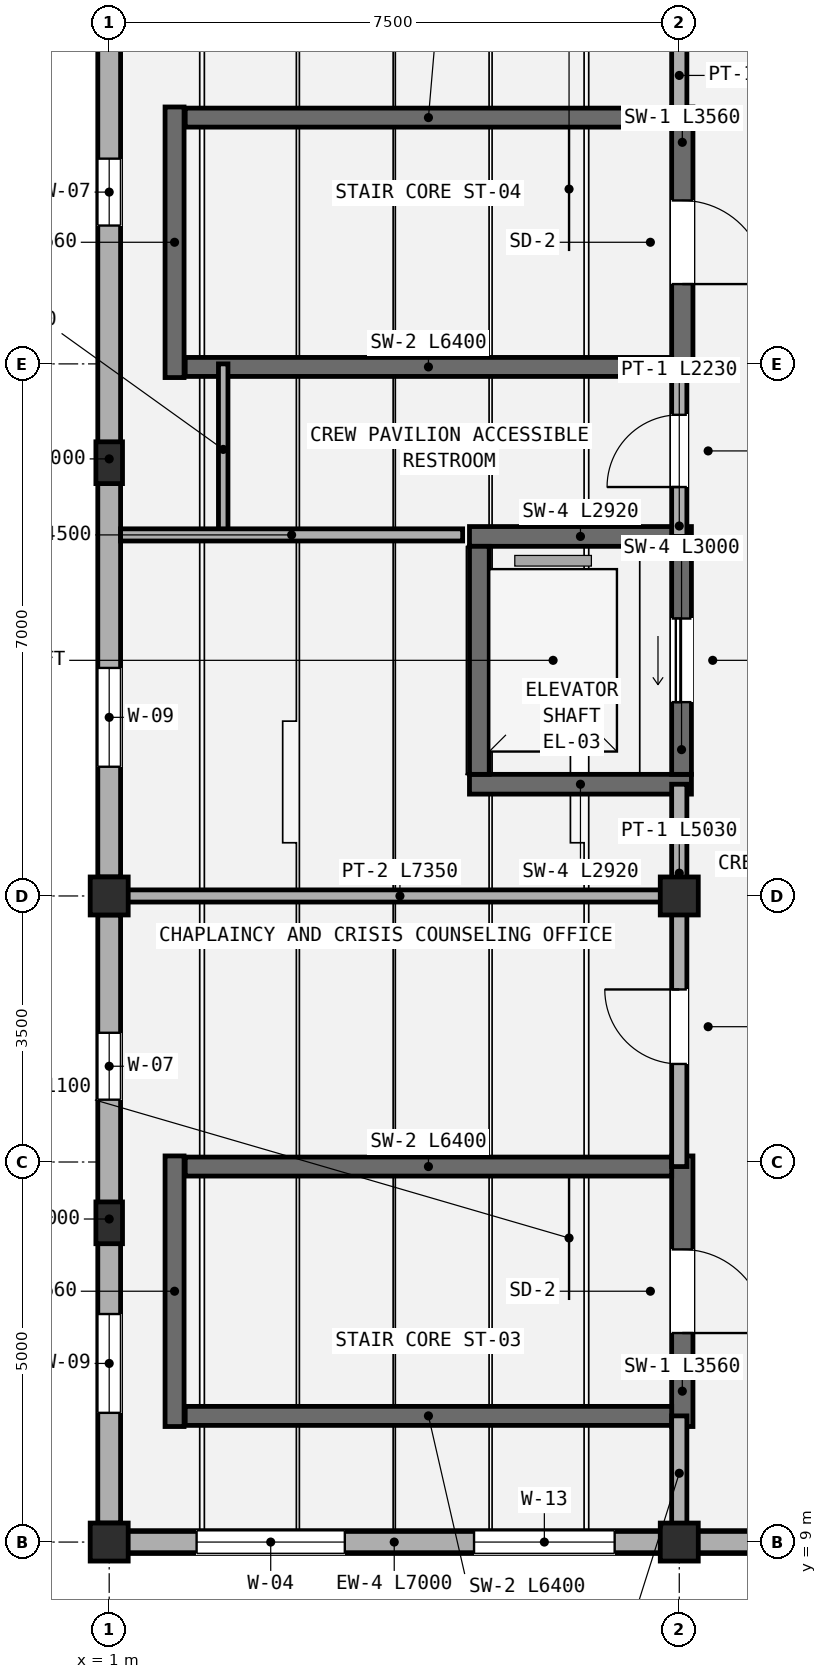
"""IFC4 building model, lengths in metres.
Left out: names, types, materials, properties, quantities, classifications, styles, units other than length and angle.
Written with IfcOpenShell. Run it as: python <this file> out.ifc"""

import sys

from ifc_helpers import new_model, si_unit, direction, frame, frame_2d, origin, origin_2d, place, context, subcontext, project, spatial, polyline, rectangle, outline, extrude, element, fill, save


model = new_model("IFC4")
c1 = context("Model", 3, precision=1e-05, world=origin(), true_north=direction((0.0, 1.0)))
c2 = subcontext(c1, "Body", "Model", "MODEL_VIEW")
j1 = project(units=[si_unit("LENGTHUNIT", "METRE"), si_unit("PLANEANGLEUNIT", "RADIAN")], contexts=[c1])
p1 = place(None, origin())
s1 = spatial("IfcSite", under=j1, at=p1, CompositionType="ELEMENT")
p2 = place(p1, origin())
s2 = spatial("IfcBuilding", under=s1, at=p2, CompositionType="ELEMENT")
p3 = place(p2, frame((0.0, 0.0, 12.75)))
s3 = spatial("IfcBuildingStorey", under=s2, at=p3, CompositionType="ELEMENT", Elevation=12.75)
for number, where, z_axis, x_axis in (
    (1, (1.0, 9.0, 0.0), (0.0, 0.0, 1.0), (1.0, 0.0, 0.0)),
    (2, (1.0, 17.5, 0.0), (0.0, 0.0, 1.0), (1.0, 0.0, 0.0)),
    (3, (8.5, 9.0, 0.0), (0.0, 0.0, 1.0), (1.0, 0.0, 0.0)),
    (4, (8.5, 17.5, 0.0), (0.0, 0.0, 1.0), (1.0, 0.0, 0.0)),
):
    element("IfcColumn", number, at=place(p3, frame(where, z_axis=z_axis, x_axis=x_axis)), inside=s3, PredefinedType="COLUMN", context=c2, shape_type="SweptSolid", body=[
        extrude(rectangle(XDim=0.5, YDim=0.5, at=origin_2d()), origin(), (0.0, 0.0, 1.0), 2.9),
    ])
for number, where, z_axis, x_axis in (
    (5, (1.0, 13.2, 0.0), (0.0, 0.0, 1.0), (1.0, 0.0, 0.0)),
    (6, (1.0, 23.2, 0.0), (0.0, 0.0, 1.0), (1.0, 0.0, 0.0)),
):
    element("IfcColumn", number, at=place(p3, frame(where, z_axis=z_axis, x_axis=x_axis)), inside=s3, PredefinedType="PILASTER", context=c2, shape_type="SweptSolid", body=[
        extrude(rectangle(XDim=0.35, YDim=0.55, at=origin_2d()), origin(), (0.0, 0.0, 1.0), 2.9),
    ])
p4 = place(p3, frame((1.25, 9.0, 0.0), z_axis=(0.0, 0.0, 1.0), x_axis=(1.0, 0.0, 0.0)))
e7 = element("IfcWall", 7, at=p4, inside=s3, PredefinedType="STANDARD", context=c2, shape_type="SweptSolid", body=[
    extrude(rectangle(XDim=7.0, YDim=0.3, at=frame_2d((3.5, 0.0))), origin(), (0.0, 0.0, 1.0), 2.25),
])
p5 = place(p4, frame((0.9, 0.0, 0.66)))
e8 = element("IfcOpeningElement", 8, at=p5, cuts=e7, PredefinedType="OPENING", context=c2, shape_type="SweptSolid", body=[
    extrude(rectangle(XDim=1.95, YDim=1.35, at=frame_2d((0.975, 0.675))), frame((0.0, 0.16, 0.0), z_axis=(0.0, -1.0, 0.0), x_axis=(1.0, 0.0, 0.0)), (0.0, 0.0, 1.0), 0.32),
])
p6 = place(p4, frame((4.55, 0.0, 0.71)))
e9 = element("IfcOpeningElement", 9, at=p6, cuts=e7, PredefinedType="OPENING", context=c2, shape_type="SweptSolid", body=[
    extrude(rectangle(XDim=1.85, YDim=1.3, at=frame_2d((0.925, 0.65))), frame((0.0, 0.16, 0.0), z_axis=(0.0, -1.0, 0.0), x_axis=(1.0, 0.0, 0.0)), (0.0, 0.0, 1.0), 0.32),
])
p7 = place(p3, frame((8.75, 9.0, 0.0), z_axis=(0.0, 0.0, 1.0), x_axis=(1.0, 0.0, 0.0)))
e10 = element("IfcWall", 10, at=p7, inside=s3, PredefinedType="STANDARD", context=c2, shape_type="SweptSolid", body=[
    extrude(rectangle(XDim=3.5, YDim=0.3, at=frame_2d((1.75, 0.0))), origin(), (0.0, 0.0, 1.0), 2.25),
])
p8 = place(p7, frame((0.9, 0.0, 0.66)))
e11 = element("IfcOpeningElement", 11, at=p8, cuts=e10, PredefinedType="OPENING", context=c2, shape_type="SweptSolid", body=[
    extrude(rectangle(XDim=1.95, YDim=1.35, at=frame_2d((0.975, 0.675))), frame((0.0, 0.16, 0.0), z_axis=(0.0, -1.0, 0.0), x_axis=(1.0, 0.0, 0.0)), (0.0, 0.0, 1.0), 0.32),
])
p9 = place(p3, frame((1.0, 9.0, 2.9), z_axis=(0.0, 0.0, 1.0), x_axis=(1.0, 0.0, 0.0)))
e12 = element("IfcWall", 12, at=p9, inside=s3, PredefinedType="PARAPET", context=c2, shape_type="SweptSolid", body=[
    extrude(outline(polyline([(0.0, 0.0), (7.5, 0.0), (7.5, 0.8), (6.668, 0.8), (6.667, 0.888), (5.834, 0.888), (5.833, 0.975), (5.001, 0.975), (5.0, 1.062), (4.168, 1.062), (4.167, 1.15), (3.334, 1.15), (3.333, 1.062), (2.501, 1.062), (2.5, 0.975), (1.668, 0.975), (1.667, 0.888), (0.834, 0.888), (0.833, 0.8), (0.0, 0.8), (0.0, 0.0)])), frame((0.0, 0.14, 0.0), z_axis=(0.0, -1.0, 0.0), x_axis=(1.0, 0.0, 0.0)), (0.0, 0.0, 1.0), 0.28),
])
p10 = place(p3, frame((8.5, 9.0, 2.9), z_axis=(0.0, 0.0, 1.0), x_axis=(1.0, 0.0, 0.0)))
e13 = element("IfcWall", 13, at=p10, inside=s3, PredefinedType="PARAPET", context=c2, shape_type="SweptSolid", body=[
    extrude(outline(polyline([(0.0, 0.0), (4.0, 0.0), (4.0, 0.8), (3.557, 0.8), (3.556, 0.888), (3.112, 0.888), (3.111, 0.975), (2.668, 0.975), (2.667, 1.062), (2.223, 1.062), (2.222, 1.15), (1.779, 1.15), (1.778, 1.062), (1.334, 1.062), (1.333, 0.975), (0.89, 0.975), (0.889, 0.888), (0.445, 0.888), (0.444, 0.8), (0.0, 0.8), (0.0, 0.0)])), frame((0.0, 0.14, 0.0), z_axis=(0.0, -1.0, 0.0), x_axis=(1.0, 0.0, 0.0)), (0.0, 0.0, 1.0), 0.28),
])
p11 = place(p3, frame((1.0, 17.25, 0.0), z_axis=(0.0, 0.0, 1.0), x_axis=(0.0, -1.0, 0.0)))
e14 = element("IfcWall", 14, at=p11, inside=s3, PredefinedType="STANDARD", context=c2, shape_type="SweptSolid", body=[
    extrude(rectangle(XDim=8.0, YDim=0.3, at=frame_2d((4.0, 0.0))), origin(), (0.0, 0.0, 1.0), 2.25),
])
p12 = place(p11, frame((1.55, 0.0, 0.51)))
e15 = element("IfcOpeningElement", 15, at=p12, cuts=e14, PredefinedType="OPENING", context=c2, shape_type="SweptSolid", body=[
    extrude(rectangle(XDim=0.88, YDim=1.5, at=frame_2d((0.44, 0.75))), frame((0.0, 0.16, 0.0), z_axis=(0.0, -1.0, 0.0), x_axis=(1.0, 0.0, 0.0)), (0.0, 0.0, 1.0), 0.32),
])
p13 = place(p11, frame((5.25, 0.0, 0.61)))
e16 = element("IfcOpeningElement", 16, at=p13, cuts=e14, PredefinedType="OPENING", context=c2, shape_type="SweptSolid", body=[
    extrude(rectangle(XDim=1.3, YDim=1.4, at=frame_2d((0.65, 0.7))), frame((0.0, 0.16, 0.0), z_axis=(0.0, -1.0, 0.0), x_axis=(1.0, 0.0, 0.0)), (0.0, 0.0, 1.0), 0.32),
])
p14 = place(p3, frame((1.0, 28.75, 0.0), z_axis=(0.0, 0.0, 1.0), x_axis=(0.0, -1.0, 0.0)))
e17 = element("IfcWall", 17, at=p14, inside=s3, PredefinedType="STANDARD", context=c2, shape_type="SweptSolid", body=[
    extrude(rectangle(XDim=11.0, YDim=0.3, at=frame_2d((5.5, 0.0))), origin(), (0.0, 0.0, 1.0), 2.25),
])
p15 = place(p14, frame((1.55, 0.0, 0.51)))
e18 = element("IfcOpeningElement", 18, at=p15, cuts=e17, PredefinedType="OPENING", context=c2, shape_type="SweptSolid", body=[
    extrude(rectangle(XDim=0.88, YDim=1.5, at=frame_2d((0.44, 0.75))), frame((0.0, 0.16, 0.0), z_axis=(0.0, -1.0, 0.0), x_axis=(1.0, 0.0, 0.0)), (0.0, 0.0, 1.0), 0.32),
])
p16 = place(p14, frame((8.25, 0.0, 0.61)))
e19 = element("IfcOpeningElement", 19, at=p16, cuts=e17, PredefinedType="OPENING", context=c2, shape_type="SweptSolid", body=[
    extrude(rectangle(XDim=1.3, YDim=1.4, at=frame_2d((0.65, 0.7))), frame((0.0, 0.16, 0.0), z_axis=(0.0, -1.0, 0.0), x_axis=(1.0, 0.0, 0.0)), (0.0, 0.0, 1.0), 0.32),
])
p17 = place(p3, frame((8.54, 14.08, 0.0), z_axis=(0.0, 0.0, 1.0), x_axis=(0.0, -1.0, 0.0)))
e20 = element("IfcWall", 20, at=p17, inside=s3, PredefinedType="SHEAR", context=c2, shape_type="SweptSolid", body=[
    extrude(rectangle(XDim=3.56, YDim=0.28, at=frame_2d((1.78, 0.0))), origin(), (0.0, 0.0, 1.0), 2.8),
])
p18 = place(p17, frame((1.23, 0.0, 0.0)))
e21 = element("IfcOpeningElement", 21, at=p18, cuts=e20, PredefinedType="OPENING", context=c2, shape_type="SweptSolid", body=[
    extrude(rectangle(XDim=1.1, YDim=2.15, at=frame_2d((0.55, 1.075))), frame((0.0, 0.15, 0.0), z_axis=(0.0, -1.0, 0.0), x_axis=(1.0, 0.0, 0.0)), (0.0, 0.0, 1.0), 0.3),
])
p19 = place(p3, frame((1.86, 10.52, 0.0), z_axis=(0.0, 0.0, 1.0), x_axis=(0.0, 1.0, 0.0)))
e22 = element("IfcWall", 22, at=p19, inside=s3, PredefinedType="SHEAR", context=c2, shape_type="SweptSolid", body=[
    extrude(rectangle(XDim=3.56, YDim=0.25, at=frame_2d((1.78, 0.0))), origin(), (0.0, 0.0, 1.0), 2.8),
])
for number, where, z_axis, x_axis in (
    (23, (8.4, 13.94, 0.0), (0.0, 0.0, 1.0), (-1.0, 0.0, 0.0)),
    (24, (2.0, 10.66, 0.0), (0.0, 0.0, 1.0), (1.0, 0.0, 0.0)),
):
    element("IfcWall", number, at=place(p3, frame(where, z_axis=z_axis, x_axis=x_axis)), inside=s3, PredefinedType="SHEAR", context=c2, shape_type="SweptSolid", body=[
        extrude(rectangle(XDim=6.4, YDim=0.25, at=frame_2d((3.2, 0.0))), origin(), (0.0, 0.0, 1.0), 2.8),
    ])
p20 = place(p3, frame((8.54, 27.88, 0.0), z_axis=(0.0, 0.0, 1.0), x_axis=(0.0, -1.0, 0.0)))
e25 = element("IfcWall", 25, at=p20, inside=s3, PredefinedType="SHEAR", context=c2, shape_type="SweptSolid", body=[
    extrude(rectangle(XDim=3.56, YDim=0.28, at=frame_2d((1.78, 0.0))), origin(), (0.0, 0.0, 1.0), 2.8),
])
p21 = place(p20, frame((1.23, 0.0, 0.0)))
e26 = element("IfcOpeningElement", 26, at=p21, cuts=e25, PredefinedType="OPENING", context=c2, shape_type="SweptSolid", body=[
    extrude(rectangle(XDim=1.1, YDim=2.15, at=frame_2d((0.55, 1.075))), frame((0.0, 0.15, 0.0), z_axis=(0.0, -1.0, 0.0), x_axis=(1.0, 0.0, 0.0)), (0.0, 0.0, 1.0), 0.3),
])
p22 = place(p3, frame((1.86, 24.32, 0.0), z_axis=(0.0, 0.0, 1.0), x_axis=(0.0, 1.0, 0.0)))
e27 = element("IfcWall", 27, at=p22, inside=s3, PredefinedType="SHEAR", context=c2, shape_type="SweptSolid", body=[
    extrude(rectangle(XDim=3.56, YDim=0.25, at=frame_2d((1.78, 0.0))), origin(), (0.0, 0.0, 1.0), 2.8),
])
for number, where, z_axis, x_axis in (
    (28, (8.4, 27.74, 0.0), (0.0, 0.0, 1.0), (-1.0, 0.0, 0.0)),
    (29, (2.0, 24.46, 0.0), (0.0, 0.0, 1.0), (1.0, 0.0, 0.0)),
):
    element("IfcWall", number, at=place(p3, frame(where, z_axis=z_axis, x_axis=x_axis)), inside=s3, PredefinedType="SHEAR", context=c2, shape_type="SweptSolid", body=[
        extrude(rectangle(XDim=6.4, YDim=0.25, at=frame_2d((3.2, 0.0))), origin(), (0.0, 0.0, 1.0), 2.8),
    ])
for number, where, z_axis, x_axis in (
    (30, (5.74, 18.97, 0.0), (0.0, 0.0, 1.0), (1.0, 0.0, 0.0)),
    (31, (8.66, 22.23, 0.0), (0.0, 0.0, 1.0), (-1.0, 0.0, 0.0)),
):
    element("IfcWall", number, at=place(p3, frame(where, z_axis=z_axis, x_axis=x_axis)), inside=s3, PredefinedType="SHEAR", context=c2, shape_type="SweptSolid", body=[
        extrude(rectangle(XDim=2.92, YDim=0.26, at=frame_2d((1.46, 0.0))), origin(), (0.0, 0.0, 1.0), 2.8),
    ])
p23 = place(p3, frame((5.87, 22.1, 0.0), z_axis=(0.0, 0.0, 1.0), x_axis=(0.0, -1.0, 0.0)))
e32 = element("IfcWall", 32, at=p23, inside=s3, PredefinedType="SHEAR", context=c2, shape_type="SweptSolid", body=[
    extrude(rectangle(XDim=3.0, YDim=0.26, at=frame_2d((1.5, 0.0))), origin(), (0.0, 0.0, 1.0), 2.8),
])
p24 = place(p3, frame((8.53, 19.1, 0.0), z_axis=(0.0, 0.0, 1.0), x_axis=(0.0, 1.0, 0.0)))
e33 = element("IfcWall", 33, at=p24, inside=s3, PredefinedType="SHEAR", context=c2, shape_type="SweptSolid", body=[
    extrude(rectangle(XDim=3.0, YDim=0.26, at=frame_2d((1.5, 0.0))), origin(), (0.0, 0.0, 1.0), 2.8),
])
p25 = place(p24, frame((0.95, 0.0, 0.0)))
e34 = element("IfcOpeningElement", 34, at=p25, cuts=e33, PredefinedType="OPENING", context=c2, shape_type="SweptSolid", body=[
    extrude(rectangle(XDim=1.1, YDim=2.15, at=frame_2d((0.55, 1.075))), frame((0.0, 0.14, 0.0), z_axis=(0.0, -1.0, 0.0), x_axis=(1.0, 0.0, 0.0)), (0.0, 0.0, 1.0), 0.28),
])
p26 = place(p3, frame((8.5, 9.15, 0.0), z_axis=(0.0, 0.0, 1.0), x_axis=(0.0, 1.0, 0.0)))
e35 = element("IfcWall", 35, at=p26, inside=s3, PredefinedType="PARTITIONING", context=c2, shape_type="SweptSolid", body=[
    extrude(rectangle(XDim=1.51, YDim=0.2, at=frame_2d((0.755, 0.0))), origin(), (0.0, 0.0, 1.0), 2.15),
])
p27 = place(p3, frame((8.5, 13.94, 0.0), z_axis=(0.0, 0.0, 1.0), x_axis=(0.0, 1.0, 0.0)))
e36 = element("IfcWall", 36, at=p27, inside=s3, PredefinedType="PARTITIONING", context=c2, shape_type="SweptSolid", body=[
    extrude(rectangle(XDim=5.03, YDim=0.2, at=frame_2d((2.515, 0.0))), origin(), (0.0, 0.0, 1.0), 2.15),
])
p28 = place(p27, frame((1.35, 0.0, 0.0)))
e37 = element("IfcOpeningElement", 37, at=p28, cuts=e36, PredefinedType="OPENING", context=c2, shape_type="SweptSolid", body=[
    extrude(rectangle(XDim=0.98, YDim=2.12, at=frame_2d((0.49, 1.06))), frame((0.0, 0.11, 0.0), z_axis=(0.0, -1.0, 0.0), x_axis=(1.0, 0.0, 0.0)), (0.0, 0.0, 1.0), 0.22),
])
p29 = place(p3, frame((8.5, 22.23, 0.0), z_axis=(0.0, 0.0, 1.0), x_axis=(0.0, 1.0, 0.0)))
e38 = element("IfcWall", 38, at=p29, inside=s3, PredefinedType="PARTITIONING", context=c2, shape_type="SweptSolid", body=[
    extrude(rectangle(XDim=2.23, YDim=0.2, at=frame_2d((1.115, 0.0))), origin(), (0.0, 0.0, 1.0), 2.15),
])
p30 = place(p29, frame((0.65, 0.0, 0.0)))
e39 = element("IfcOpeningElement", 39, at=p30, cuts=e38, PredefinedType="OPENING", context=c2, shape_type="SweptSolid", body=[
    extrude(rectangle(XDim=0.95, YDim=2.1, at=frame_2d((0.475, 1.05))), frame((0.0, 0.11, 0.0), z_axis=(0.0, -1.0, 0.0), x_axis=(1.0, 0.0, 0.0)), (0.0, 0.0, 1.0), 0.22),
])
p31 = place(p3, frame((8.5, 27.74, 0.0), z_axis=(0.0, 0.0, 1.0), x_axis=(0.0, 1.0, 0.0)))
e40 = element("IfcWall", 40, at=p31, inside=s3, PredefinedType="PARTITIONING", context=c2, shape_type="SweptSolid", body=[
    extrude(rectangle(XDim=1.11, YDim=0.2, at=frame_2d((0.555, 0.0))), origin(), (0.0, 0.0, 1.0), 2.15),
])
p32 = place(p3, frame((2.5, 22.25, 0.0), z_axis=(0.0, 0.0, 1.0), x_axis=(0.0, 1.0, 0.0)))
e41 = element("IfcWall", 41, at=p32, inside=s3, PredefinedType="PARTITIONING", context=c2, shape_type="SweptSolid", body=[
    extrude(rectangle(XDim=2.25, YDim=0.125, at=frame_2d((1.125, 0.0))), origin(), (0.0, 0.0, 1.0), 2.15),
])
p33 = place(p3, frame((1.15, 17.5, 0.0), z_axis=(0.0, 0.0, 1.0), x_axis=(1.0, 0.0, 0.0)))
e42 = element("IfcWall", 42, at=p33, inside=s3, PredefinedType="PARTITIONING", context=c2, shape_type="SweptSolid", body=[
    extrude(rectangle(XDim=7.35, YDim=0.16, at=frame_2d((3.675, 0.0))), origin(), (0.0, 0.0, 1.0), 2.15),
])
p34 = place(p3, frame((1.15, 22.25, 0.0), z_axis=(0.0, 0.0, 1.0), x_axis=(1.0, 0.0, 0.0)))
e43 = element("IfcWall", 43, at=p34, inside=s3, PredefinedType="PARTITIONING", context=c2, shape_type="SweptSolid", body=[
    extrude(rectangle(XDim=4.5, YDim=0.16, at=frame_2d((2.25, 0.0))), origin(), (0.0, 0.0, 1.0), 2.15),
])
p35 = place(p5, origin())
e44 = element("IfcWindow", 44, at=p35, inside=s3, PartitioningType="DOUBLE_PANEL_HORIZONTAL", PredefinedType="WINDOW", context=c2, shape_type="SweptSolid", body=[
    extrude(rectangle(XDim=1.95, YDim=1.35, at=frame_2d((0.975, 0.675))), frame((0.0, 0.03, 0.0), z_axis=(0.0, -1.0, 0.0), x_axis=(1.0, 0.0, 0.0)), (0.0, 0.0, 1.0), 0.06),
])
fill(e8, e44)
p36 = place(p6, origin())
e45 = element("IfcWindow", 45, at=p36, inside=s3, PartitioningType="DOUBLE_PANEL_HORIZONTAL", PredefinedType="WINDOW", context=c2, shape_type="SweptSolid", body=[
    extrude(rectangle(XDim=1.85, YDim=1.3, at=frame_2d((0.925, 0.65))), frame((0.0, 0.03, 0.0), z_axis=(0.0, -1.0, 0.0), x_axis=(1.0, 0.0, 0.0)), (0.0, 0.0, 1.0), 0.06),
])
fill(e9, e45)
p37 = place(p12, origin())
e46 = element("IfcWindow", 46, at=p37, inside=s3, PartitioningType="SINGLE_PANEL", PredefinedType="WINDOW", context=c2, shape_type="SweptSolid", body=[
    extrude(rectangle(XDim=0.88, YDim=1.5, at=frame_2d((0.44, 0.75))), frame((0.0, 0.03, 0.0), z_axis=(0.0, -1.0, 0.0), x_axis=(1.0, 0.0, 0.0)), (0.0, 0.0, 1.0), 0.06),
])
fill(e15, e46)
p38 = place(p13, origin())
e47 = element("IfcWindow", 47, at=p38, inside=s3, PartitioningType="SINGLE_PANEL", PredefinedType="WINDOW", context=c2, shape_type="SweptSolid", body=[
    extrude(rectangle(XDim=1.3, YDim=1.4, at=frame_2d((0.65, 0.7))), frame((0.0, 0.03, 0.0), z_axis=(0.0, -1.0, 0.0), x_axis=(1.0, 0.0, 0.0)), (0.0, 0.0, 1.0), 0.06),
])
fill(e16, e47)
p39 = place(p15, origin())
e48 = element("IfcWindow", 48, at=p39, inside=s3, PartitioningType="SINGLE_PANEL", PredefinedType="WINDOW", context=c2, shape_type="SweptSolid", body=[
    extrude(rectangle(XDim=0.88, YDim=1.5, at=frame_2d((0.44, 0.75))), frame((0.0, 0.03, 0.0), z_axis=(0.0, -1.0, 0.0), x_axis=(1.0, 0.0, 0.0)), (0.0, 0.0, 1.0), 0.06),
])
fill(e18, e48)
p40 = place(p16, origin())
e49 = element("IfcWindow", 49, at=p40, inside=s3, PartitioningType="SINGLE_PANEL", PredefinedType="WINDOW", context=c2, shape_type="SweptSolid", body=[
    extrude(rectangle(XDim=1.3, YDim=1.4, at=frame_2d((0.65, 0.7))), frame((0.0, 0.03, 0.0), z_axis=(0.0, -1.0, 0.0), x_axis=(1.0, 0.0, 0.0)), (0.0, 0.0, 1.0), 0.06),
])
fill(e19, e49)
p41 = place(p18, origin())
e50 = element("IfcDoor", 50, at=p41, inside=s3, OperationType="SINGLE_SWING_RIGHT", PredefinedType="DOOR", context=c2, shape_type="SweptSolid", body=[
    extrude(rectangle(XDim=1.1, YDim=2.15, at=frame_2d((0.55, 1.075))), frame((0.0, 0.025, 0.0), z_axis=(0.0, -1.0, 0.0), x_axis=(1.0, 0.0, 0.0)), (0.0, 0.0, 1.0), 0.05),
])
fill(e21, e50)
p42 = place(p21, origin())
e51 = element("IfcDoor", 51, at=p42, inside=s3, OperationType="SINGLE_SWING_RIGHT", PredefinedType="DOOR", context=c2, shape_type="SweptSolid", body=[
    extrude(rectangle(XDim=1.1, YDim=2.15, at=frame_2d((0.55, 1.075))), frame((0.0, 0.025, 0.0), z_axis=(0.0, -1.0, 0.0), x_axis=(1.0, 0.0, 0.0)), (0.0, 0.0, 1.0), 0.05),
])
fill(e26, e51)
p43 = place(p25, origin())
e52 = element("IfcDoor", 52, at=p43, inside=s3, OperationType="SLIDING_TO_LEFT", PredefinedType="DOOR", context=c2, shape_type="SweptSolid", body=[
    extrude(rectangle(XDim=1.1, YDim=2.15, at=frame_2d((0.55, 1.075))), frame((0.0, 0.025, 0.0), z_axis=(0.0, -1.0, 0.0), x_axis=(1.0, 0.0, 0.0)), (0.0, 0.0, 1.0), 0.05),
])
fill(e34, e52)
p44 = place(p28, origin())
e53 = element("IfcDoor", 53, at=p44, inside=s3, OperationType="SINGLE_SWING_RIGHT", PredefinedType="DOOR", context=c2, shape_type="SweptSolid", body=[
    extrude(rectangle(XDim=0.98, YDim=2.12, at=frame_2d((0.49, 1.06))), frame((0.0, 0.025, 0.0), z_axis=(0.0, -1.0, 0.0), x_axis=(1.0, 0.0, 0.0)), (0.0, 0.0, 1.0), 0.05),
])
fill(e37, e53)
p45 = place(p30, origin())
e54 = element("IfcDoor", 54, at=p45, inside=s3, OperationType="SINGLE_SWING_LEFT", PredefinedType="DOOR", context=c2, shape_type="SweptSolid", body=[
    extrude(rectangle(XDim=0.95, YDim=2.1, at=frame_2d((0.475, 1.05))), frame((0.0, 0.025, 0.0), z_axis=(0.0, -1.0, 0.0), x_axis=(1.0, 0.0, 0.0)), (0.0, 0.0, 1.0), 0.05),
])
fill(e39, e54)
save(model, sys.argv[1])
